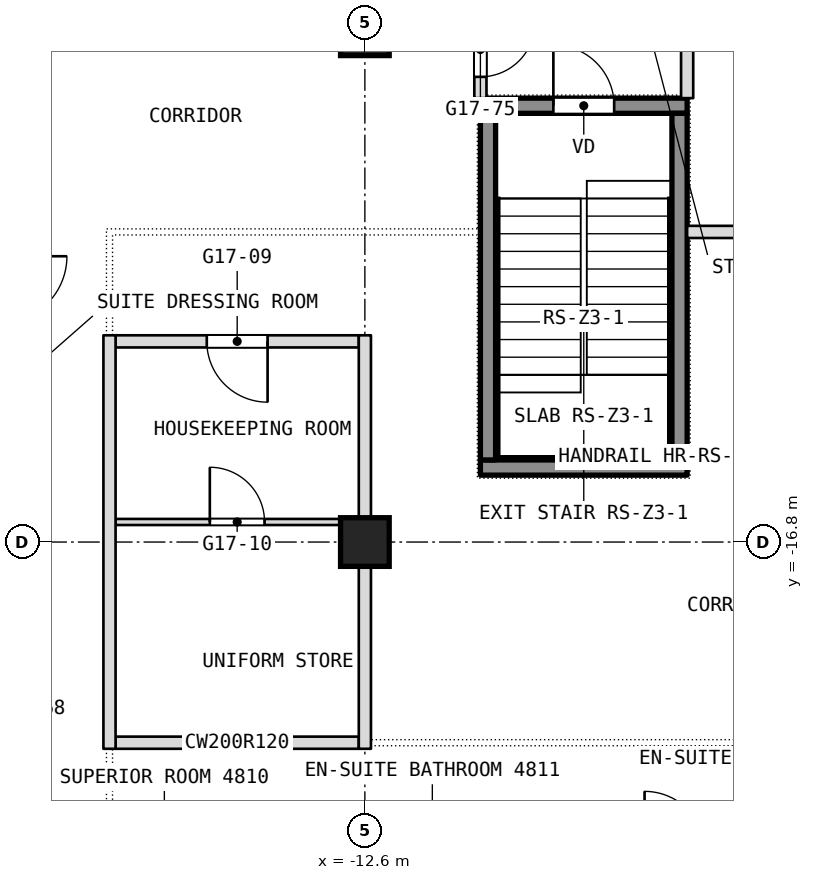
"""IFC4 building model, lengths in metres.
Left out: names, types, materials, properties, quantities, classifications, styles, units other than length and angle.
Written with IfcOpenShell. Run it as: python <this file> out.ifc"""

import sys

from ifc_helpers import new_model, si_unit, direction, frame, frame_2d, origin, origin_2d, place, context, subcontext, project, spatial, rectangle, extrude, element, fill, save


model = new_model("IFC4")
c1 = context("Model", 3, precision=1e-05, world=origin(), true_north=direction((0.0, 1.0)))
c2 = subcontext(c1, "Body", "Model", "MODEL_VIEW")
j1 = project(units=[si_unit("LENGTHUNIT", "METRE"), si_unit("PLANEANGLEUNIT", "RADIAN")], contexts=[c1])
p1 = place(None, origin())
s1 = spatial("IfcSite", under=j1, at=p1, CompositionType="ELEMENT")
p2 = place(p1, origin())
s2 = spatial("IfcBuilding", under=s1, at=p2, CompositionType="ELEMENT")
p3 = place(p2, frame((0.0, 0.0, 209.3)))
s3 = spatial("IfcBuildingStorey", under=s2, at=p3, CompositionType="ELEMENT", Elevation=209.3)
for number, where, z_axis, x_axis in (
    (1, (-12.6, -16.8, 0.0), (0.0, 0.0, 1.0), (1.0, 0.0, 0.0)),
    (2, (-12.6, -8.4, 0.0), (0.0, 0.0, 1.0), (1.0, 0.0, 0.0)),
):
    element("IfcColumn", number, at=place(p3, frame(where, z_axis=z_axis, x_axis=x_axis)), inside=s3, PredefinedType="COLUMN", context=c2, shape_type="SweptSolid", body=[
        extrude(rectangle(XDim=0.8, YDim=0.8, at=origin_2d()), origin(), (0.0, 0.0, 1.0), 3.6),
    ])
p4 = place(p3, frame((-16.7, -20.1, 0.0), z_axis=(0.0, 0.0, 1.0), x_axis=(1.0, 0.0, 0.0)))
e3 = element("IfcWall", 3, at=p4, inside=s3, PredefinedType="PARTITIONING", context=c2, shape_type="SweptSolid", body=[
    extrude(rectangle(XDim=4.0, YDim=0.2, at=frame_2d((2.0, 0.0))), origin(), (0.0, 0.0, 1.0), 3.34),
])
p5 = place(p3, frame((-16.7, -16.47, 0.0), z_axis=(0.0, 0.0, 1.0), x_axis=(1.0, 0.0, 0.0)))
e4 = element("IfcWall", 4, at=p5, inside=s3, PredefinedType="PARTITIONING", context=c2, shape_type="SweptSolid", body=[
    extrude(rectangle(XDim=4.0, YDim=0.1, at=frame_2d((2.0, 0.0))), origin(), (0.0, 0.0, 1.0), 3.34),
])
p6 = place(p5, frame((1.55, 0.0, 0.0)))
e5 = element("IfcOpeningElement", 5, at=p6, cuts=e4, PredefinedType="OPENING", context=c2, shape_type="SweptSolid", body=[
    extrude(rectangle(XDim=0.9, YDim=2.1, at=frame_2d((0.45, 1.05))), frame((0.0, 0.05, 0.0), z_axis=(0.0, -1.0, 0.0), x_axis=(1.0, 0.0, 0.0)), (0.0, 0.0, 1.0), 0.1),
])
p7 = place(p3, frame((-16.7, -13.5, 0.0), z_axis=(0.0, 0.0, 1.0), x_axis=(1.0, 0.0, 0.0)))
e6 = element("IfcWall", 6, at=p7, inside=s3, PredefinedType="PARTITIONING", context=c2, shape_type="SweptSolid", body=[
    extrude(rectangle(XDim=4.0, YDim=0.2, at=frame_2d((2.0, 0.0))), origin(), (0.0, 0.0, 1.0), 3.34),
])
p8 = place(p7, frame((1.5, 0.0, 0.0)))
e7 = element("IfcOpeningElement", 7, at=p8, cuts=e6, PredefinedType="OPENING", context=c2, shape_type="SweptSolid", body=[
    extrude(rectangle(XDim=1.0, YDim=2.1, at=frame_2d((0.5, 1.05))), frame((0.0, 0.1, 0.0), z_axis=(0.0, -1.0, 0.0), x_axis=(1.0, 0.0, 0.0)), (0.0, 0.0, 1.0), 0.2),
])
p9 = place(p3, frame((-7.3, -11.7, 0.0), z_axis=(0.0, 0.0, 1.0), x_axis=(1.0, 0.0, 0.0)))
e8 = element("IfcWall", 8, at=p9, inside=s3, PredefinedType="PARTITIONING", context=c2, shape_type="SweptSolid", body=[
    extrude(rectangle(XDim=14.6, YDim=0.2, at=frame_2d((7.3, 0.0))), origin(), (0.0, 0.0, 1.0), 3.34),
])
p10 = place(p9, frame((4.7, 0.0, 0.0)))
e9 = element("IfcOpeningElement", 9, at=p10, cuts=e8, PredefinedType="OPENING", context=c2, shape_type="SweptSolid", body=[
    extrude(rectangle(XDim=1.0, YDim=2.1, at=frame_2d((0.5, 1.05))), frame((0.0, 0.1, 0.0), z_axis=(0.0, -1.0, 0.0), x_axis=(1.0, 0.0, 0.0)), (0.0, 0.0, 1.0), 0.2),
])
p11 = place(p9, frame((8.9, 0.0, 0.0)))
e10 = element("IfcOpeningElement", 10, at=p11, cuts=e8, PredefinedType="OPENING", context=c2, shape_type="SweptSolid", body=[
    extrude(rectangle(XDim=1.0, YDim=2.1, at=frame_2d((0.5, 1.05))), frame((0.0, 0.1, 0.0), z_axis=(0.0, -1.0, 0.0), x_axis=(1.0, 0.0, 0.0)), (0.0, 0.0, 1.0), 0.2),
])
p12 = place(p3, frame((-7.3, -9.5, 0.0), z_axis=(0.0, 0.0, 1.0), x_axis=(0.0, 1.0, 0.0)))
e11 = element("IfcWall", 11, at=p12, inside=s3, PredefinedType="PARTITIONING", context=c2, shape_type="SweptSolid", body=[
    extrude(rectangle(XDim=1.7, YDim=0.2, at=frame_2d((0.85, 0.0))), origin(), (0.0, 0.0, 1.0), 3.34),
])
p13 = place(p3, frame((-10.7, -9.5, 0.0), z_axis=(0.0, 0.0, 1.0), x_axis=(0.0, 1.0, 0.0)))
e12 = element("IfcWall", 12, at=p13, inside=s3, PredefinedType="PARTITIONING", context=c2, shape_type="SweptSolid", body=[
    extrude(rectangle(XDim=1.5, YDim=0.2, at=frame_2d((0.75, 0.0))), origin(), (0.0, 0.0, 1.0), 3.34),
])
p14 = place(p13, frame((0.35, 0.0, 0.0)))
e13 = element("IfcOpeningElement", 13, at=p14, cuts=e12, PredefinedType="OPENING", context=c2, shape_type="SweptSolid", body=[
    extrude(rectangle(XDim=0.9, YDim=2.1, at=frame_2d((0.45, 1.05))), frame((0.0, 0.1, 0.0), z_axis=(0.0, -1.0, 0.0), x_axis=(1.0, 0.0, 0.0)), (0.0, 0.0, 1.0), 0.2),
])
for number, where, z_axis, x_axis in (
    (14, (-12.6, -20.2, 0.0), (0.0, 0.0, 1.0), (0.0, 1.0, 0.0)),
    (15, (-16.8, -20.2, 0.0), (0.0, 0.0, 1.0), (0.0, 1.0, 0.0)),
):
    element("IfcWall", number, at=place(p3, frame(where, z_axis=z_axis, x_axis=x_axis)), inside=s3, PredefinedType="PARTITIONING", context=c2, shape_type="SweptSolid", body=[
        extrude(rectangle(XDim=6.8, YDim=0.2, at=frame_2d((3.4, 0.0))), origin(), (0.0, 0.0, 1.0), 3.34),
    ])
p15 = place(p3, frame((-10.7, -15.575, 0.1), z_axis=(0.0, 0.0, 1.0), x_axis=(1.0, 0.0, 0.0)))
e16 = element("IfcWall", 16, at=p15, inside=s3, PredefinedType="SHEAR", context=c2, shape_type="SweptSolid", body=[
    extrude(rectangle(XDim=3.4, YDim=0.25, at=frame_2d((1.7, 0.0))), origin(), (0.0, 0.0, 1.0), 3.6),
])
p16 = place(p3, frame((-10.7, -9.625, 0.1), z_axis=(0.0, 0.0, 1.0), x_axis=(1.0, 0.0, 0.0)))
e17 = element("IfcWall", 17, at=p16, inside=s3, PredefinedType="SHEAR", context=c2, shape_type="SweptSolid", body=[
    extrude(rectangle(XDim=3.4, YDim=0.25, at=frame_2d((1.7, 0.0))), origin(), (0.0, 0.0, 1.0), 3.6),
])
p17 = place(p16, frame((1.2, 0.0, 0.0)))
e18 = element("IfcOpeningElement", 18, at=p17, cuts=e17, PredefinedType="OPENING", context=c2, shape_type="SweptSolid", body=[
    extrude(rectangle(XDim=1.0, YDim=2.1, at=frame_2d((0.5, 1.05))), frame((0.0, 0.125, 0.0), z_axis=(0.0, -1.0, 0.0), x_axis=(1.0, 0.0, 0.0)), (0.0, 0.0, 1.0), 0.25),
])
for number, where, z_axis, x_axis in (
    (19, (-10.575, -15.45, 0.1), (0.0, 0.0, 1.0), (0.0, 1.0, 0.0)),
    (20, (-7.425, -15.45, 0.1), (0.0, 0.0, 1.0), (0.0, 1.0, 0.0)),
):
    element("IfcWall", number, at=place(p3, frame(where, z_axis=z_axis, x_axis=x_axis)), inside=s3, PredefinedType="SHEAR", context=c2, shape_type="SweptSolid", body=[
        extrude(rectangle(XDim=5.7, YDim=0.25, at=frame_2d((2.85, 0.0))), origin(), (0.0, 0.0, 1.0), 3.6),
    ])
p18 = place(p6, origin())
e21 = element("IfcDoor", 21, at=p18, inside=s3, OperationType="SINGLE_SWING_LEFT", PredefinedType="DOOR", context=c2, shape_type="SweptSolid", body=[
    extrude(rectangle(XDim=0.9, YDim=2.1, at=frame_2d((0.45, 1.05))), frame((0.0, 0.025, 0.0), z_axis=(0.0, -1.0, 0.0), x_axis=(1.0, 0.0, 0.0)), (0.0, 0.0, 1.0), 0.05),
])
fill(e5, e21)
p19 = place(p8, origin())
e22 = element("IfcDoor", 22, at=p19, inside=s3, OperationType="SINGLE_SWING_LEFT", PredefinedType="DOOR", context=c2, shape_type="SweptSolid", body=[
    extrude(rectangle(XDim=1.0, YDim=2.1, at=frame_2d((0.5, 1.05))), frame((0.0, 0.025, 0.0), z_axis=(0.0, -1.0, 0.0), x_axis=(1.0, 0.0, 0.0)), (0.0, 0.0, 1.0), 0.05),
])
fill(e7, e22)
p20 = place(p14, origin())
e23 = element("IfcDoor", 23, at=p20, inside=s3, OperationType="SINGLE_SWING_LEFT", PredefinedType="DOOR", context=c2, shape_type="SweptSolid", body=[
    extrude(rectangle(XDim=0.9, YDim=2.1, at=frame_2d((0.45, 1.05))), frame((0.0, 0.025, 0.0), z_axis=(0.0, -1.0, 0.0), x_axis=(1.0, 0.0, 0.0)), (0.0, 0.0, 1.0), 0.05),
])
fill(e13, e23)
p21 = place(p17, origin())
e24 = element("IfcDoor", 24, at=p21, inside=s3, OperationType="SINGLE_SWING_LEFT", PredefinedType="DOOR", context=c2, shape_type="SweptSolid", body=[
    extrude(rectangle(XDim=1.0, YDim=2.1, at=frame_2d((0.5, 1.05))), frame((0.0, 0.025, 0.0), z_axis=(0.0, -1.0, 0.0), x_axis=(1.0, 0.0, 0.0)), (0.0, 0.0, 1.0), 0.05),
])
fill(e18, e24)
save(model, sys.argv[1])
